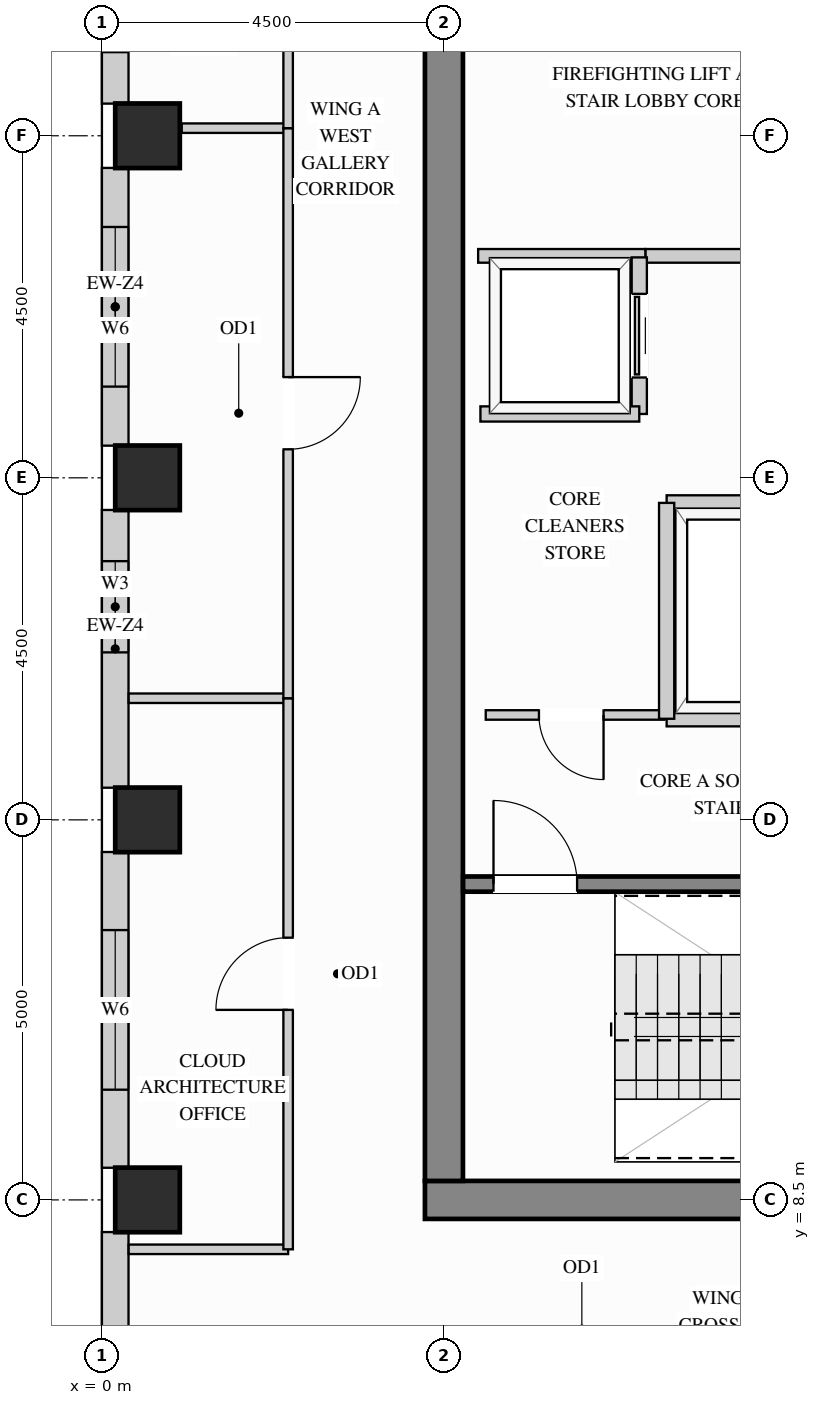
"""IFC4 building model, lengths in metres.
Left out: names, types, materials, properties, quantities, classifications, styles, units other than length and angle.
Written with IfcOpenShell. Run it as: python <this file> out.ifc"""

import sys

from ifc_helpers import new_model, si_unit, direction, frame, frame_2d, origin, origin_2d, place, context, subcontext, project, spatial, rectangle, extrude, source, transform, mapped, element, fill, save


model = new_model("IFC4")
c1 = context("Model", 3, precision=1e-05, world=origin(), true_north=direction((0.0, 1.0)))
c2 = subcontext(c1, "Body", "Model", "MODEL_VIEW")
j1 = project(units=[si_unit("LENGTHUNIT", "METRE"), si_unit("PLANEANGLEUNIT", "RADIAN")], contexts=[c1])
p1 = place(None, origin())
s1 = spatial("IfcSite", under=j1, at=p1, CompositionType="ELEMENT")
p2 = place(p1, origin())
s2 = spatial("IfcBuilding", under=s1, at=p2, CompositionType="ELEMENT")
p3 = place(p2, frame((0.0, 0.0, 266.4)))
s3 = spatial("IfcBuildingStorey", under=s2, at=p3, CompositionType="ELEMENT", Elevation=266.4)
m1 = source(origin(), c2, "Body", "SweptSolid", [
    extrude(rectangle(XDim=0.85, YDim=0.85, at=origin_2d()), origin(), (0.0, 0.0, 1.0), 3.4),
])
for number, where, z_axis, x_axis in (
    (1, (0.6, 13.5, 0.0), (0.0, 0.0, 1.0), (1.0, 0.0, 0.0)),
    (2, (0.6, 18.0, 0.0), (0.0, 0.0, 1.0), (1.0, 0.0, 0.0)),
    (3, (0.6, 22.5, 0.0), (0.0, 0.0, 1.0), (1.0, 0.0, 0.0)),
    (4, (0.6, 8.5, 0.0), (0.0, 0.0, 1.0), (1.0, 0.0, 0.0)),
):
    element("IfcColumn", number, at=place(p3, frame(where, z_axis=z_axis, x_axis=x_axis)), inside=s3, PredefinedType="COLUMN", context=c2, shape_type="MappedRepresentation", body=[
        mapped(m1, transform((0.0, 0.0, 0.0), x_axis=(1.0, 0.0, 0.0), y_axis=(0.0, 1.0, 0.0), z_axis=(0.0, 0.0, 1.0))),
    ])
m2 = source(origin(), c2, "Body", "SweptSolid", [
    extrude(rectangle(XDim=10.5, YDim=0.5, at=frame_2d((5.25, 0.0))), origin(), (0.0, 0.0, 1.0), 3.4),
])
p4 = place(p3, frame((4.25, 8.5, 0.0), z_axis=(0.0, 0.0, 1.0), x_axis=(1.0, 0.0, 0.0)))
e5 = element("IfcWall", 5, at=p4, inside=s3, PredefinedType="SHEAR", context=c2, shape_type="MappedRepresentation", body=[
    mapped(m2, transform((0.0, 0.0, 0.0), x_axis=(1.0, 0.0, 0.0), y_axis=(0.0, 1.0, 0.0), z_axis=(0.0, 0.0, 1.0))),
])
m3 = source(origin(), c2, "Body", "SweptSolid", [
    extrude(rectangle(XDim=20.5, YDim=0.5, at=frame_2d((10.25, 0.0))), origin(), (0.0, 0.0, 1.0), 3.4),
])
p5 = place(p3, frame((4.5, 8.75, 0.0), z_axis=(0.0, 0.0, 1.0), x_axis=(0.0, 1.0, 0.0)))
e6 = element("IfcWall", 6, at=p5, inside=s3, PredefinedType="SHEAR", context=c2, shape_type="MappedRepresentation", body=[
    mapped(m3, transform((0.0, 0.0, 0.0), x_axis=(1.0, 0.0, 0.0), y_axis=(0.0, 1.0, 0.0), z_axis=(0.0, 0.0, 1.0))),
])
p6 = place(p3, frame((0.175, 26.377, 0.0), z_axis=(0.0, 0.0, 1.0), x_axis=(0.0, -1.0, 0.0)))
e7 = element("IfcWall", 7, at=p6, inside=s3, PredefinedType="SOLIDWALL", context=c2, shape_type="SweptSolid", body=[
    extrude(rectangle(XDim=3.454, YDim=0.35, at=frame_2d((1.727, 0.0))), origin(), (0.0, 0.0, 1.0), 3.385),
])
p7 = place(p6, frame((0.677, 0.0, 0.78)))
e8 = element("IfcOpeningElement", 8, at=p7, cuts=e7, PredefinedType="OPENING", context=c2, shape_type="SweptSolid", body=[
    extrude(rectangle(XDim=2.1, YDim=2.25, at=frame_2d((1.05, 1.125))), frame((0.0, 0.185, 0.0), z_axis=(0.0, -1.0, 0.0), x_axis=(1.0, 0.0, 0.0)), (0.0, 0.0, 1.0), 0.37),
])
p8 = place(p3, frame((0.175, 22.077, 0.0), z_axis=(0.0, 0.0, 1.0), x_axis=(0.0, -1.0, 0.0)))
e9 = element("IfcWall", 9, at=p8, inside=s3, PredefinedType="SOLIDWALL", context=c2, shape_type="SweptSolid", body=[
    extrude(rectangle(XDim=3.654, YDim=0.35, at=frame_2d((1.827, 0.0))), origin(), (0.0, 0.0, 1.0), 3.385),
])
p9 = place(p8, frame((0.777, 0.0, 0.78)))
e10 = element("IfcOpeningElement", 10, at=p9, cuts=e9, PredefinedType="OPENING", context=c2, shape_type="SweptSolid", body=[
    extrude(rectangle(XDim=2.1, YDim=2.25, at=frame_2d((1.05, 1.125))), frame((0.0, 0.185, 0.0), z_axis=(0.0, -1.0, 0.0), x_axis=(1.0, 0.0, 0.0)), (0.0, 0.0, 1.0), 0.37),
])
p10 = place(p3, frame((0.175, 17.577, 0.0), z_axis=(0.0, 0.0, 1.0), x_axis=(0.0, -1.0, 0.0)))
e11 = element("IfcWall", 11, at=p10, inside=s3, PredefinedType="SOLIDWALL", context=c2, shape_type="SweptSolid", body=[
    extrude(rectangle(XDim=3.654, YDim=0.35, at=frame_2d((1.827, 0.0))), origin(), (0.0, 0.0, 1.0), 3.385),
])
p11 = place(p10, frame((0.674, 0.0, 0.78)))
e12 = element("IfcOpeningElement", 12, at=p11, cuts=e11, PredefinedType="OPENING", context=c2, shape_type="SweptSolid", body=[
    extrude(rectangle(XDim=1.2, YDim=2.25, at=frame_2d((0.6, 1.125))), frame((0.0, 0.185, 0.0), z_axis=(0.0, -1.0, 0.0), x_axis=(1.0, 0.0, 0.0)), (0.0, 0.0, 1.0), 0.37),
])
p12 = place(p3, frame((0.175, 13.077, 0.0), z_axis=(0.0, 0.0, 1.0), x_axis=(0.0, -1.0, 0.0)))
e13 = element("IfcWall", 13, at=p12, inside=s3, PredefinedType="SOLIDWALL", context=c2, shape_type="SweptSolid", body=[
    extrude(rectangle(XDim=4.154, YDim=0.35, at=frame_2d((2.077, 0.0))), origin(), (0.0, 0.0, 1.0), 3.385),
])
p13 = place(p12, frame((1.027, 0.0, 0.78)))
e14 = element("IfcOpeningElement", 14, at=p13, cuts=e13, PredefinedType="OPENING", context=c2, shape_type="SweptSolid", body=[
    extrude(rectangle(XDim=2.1, YDim=2.25, at=frame_2d((1.05, 1.125))), frame((0.0, 0.185, 0.0), z_axis=(0.0, -1.0, 0.0), x_axis=(1.0, 0.0, 0.0)), (0.0, 0.0, 1.0), 0.37),
])
p14 = place(p3, frame((0.175, 8.077, 0.0), z_axis=(0.0, 0.0, 1.0), x_axis=(0.0, -1.0, 0.0)))
e15 = element("IfcWall", 15, at=p14, inside=s3, PredefinedType="SOLIDWALL", context=c2, shape_type="SweptSolid", body=[
    extrude(rectangle(XDim=4.154, YDim=0.35, at=frame_2d((2.077, 0.0))), origin(), (0.0, 0.0, 1.0), 3.385),
])
p15 = place(p14, frame((2.406, 0.0, 0.78)))
e16 = element("IfcOpeningElement", 16, at=p15, cuts=e15, PredefinedType="OPENING", context=c2, shape_type="SweptSolid", body=[
    extrude(rectangle(XDim=1.2, YDim=2.25, at=frame_2d((0.6, 1.125))), frame((0.0, 0.185, 0.0), z_axis=(0.0, -1.0, 0.0), x_axis=(1.0, 0.0, 0.0)), (0.0, 0.0, 1.0), 0.37),
])
p16 = place(p3, frame((7.15, 20.92, 0.0), z_axis=(0.0, 0.0, 1.0), x_axis=(1.0, 0.0, 0.0)))
e17 = element("IfcWall", 17, at=p16, inside=s3, PredefinedType="PARTITIONING", context=c2, shape_type="SweptSolid", body=[
    extrude(rectangle(XDim=4.68, YDim=0.18, at=frame_2d((2.34, 0.0))), origin(), (0.0, 0.0, 1.0), 3.385),
])
p17 = place(p16, frame((2.2, 0.0, 0.0)))
e18 = element("IfcOpeningElement", 18, at=p17, cuts=e17, PredefinedType="OPENING", context=c2, shape_type="SweptSolid", body=[
    extrude(rectangle(XDim=1.1, YDim=2.15, at=frame_2d((0.55, 1.075))), frame((0.0, 0.1, 0.0), z_axis=(0.0, -1.0, 0.0), x_axis=(1.0, 0.0, 0.0)), (0.0, 0.0, 1.0), 0.2),
])
m4 = source(origin(), c2, "Body", "SweptSolid", [
    extrude(rectangle(XDim=2.2, YDim=0.18, at=frame_2d((1.1, 0.0))), origin(), (0.0, 0.0, 1.0), 3.385),
])
p18 = place(p3, frame((4.95, 20.92, 0.0), z_axis=(0.0, 0.0, 1.0), x_axis=(1.0, 0.0, 0.0)))
e19 = element("IfcWall", 19, at=p18, inside=s3, PredefinedType="PARTITIONING", context=c2, shape_type="MappedRepresentation", body=[
    mapped(m4, transform((0.0, 0.0, 0.0), x_axis=(1.0, 0.0, 0.0), y_axis=(0.0, 1.0, 0.0), z_axis=(0.0, 0.0, 1.0))),
])
p19 = place(p3, frame((5.05, 14.88, 0.0), z_axis=(0.0, 0.0, 1.0), x_axis=(1.0, 0.0, 0.0)))
e20 = element("IfcWall", 20, at=p19, inside=s3, PredefinedType="PARTITIONING", context=c2, shape_type="SweptSolid", body=[
    extrude(rectangle(XDim=2.35, YDim=0.125, at=frame_2d((1.175, 0.0))), origin(), (0.0, 0.0, 1.0), 3.385),
])
p20 = place(p19, frame((0.7, 0.0, 0.0)))
e21 = element("IfcOpeningElement", 21, at=p20, cuts=e20, PredefinedType="OPENING", context=c2, shape_type="SweptSolid", body=[
    extrude(rectangle(XDim=0.85, YDim=2.1, at=frame_2d((0.425, 1.05))), frame((0.0, 0.073, 0.0), z_axis=(0.0, -1.0, 0.0), x_axis=(1.0, 0.0, 0.0)), (0.0, 0.0, 1.0), 0.145),
])
m5 = source(origin(), c2, "Body", "SweptSolid", [
    extrude(rectangle(XDim=2.098, YDim=0.125, at=frame_2d((1.049, 0.0))), origin(), (0.0, 0.0, 1.0), 3.385),
])
for number, where, z_axis, x_axis in (
    (22, (0.352, 7.85, 0.0), (0.0, 0.0, 1.0), (1.0, 0.0, 0.0)),
    (23, (0.352, 15.1, 0.0), (0.0, 0.0, 1.0), (1.0, 0.0, 0.0)),
):
    element("IfcWall", number, at=place(p3, frame(where, z_axis=z_axis, x_axis=x_axis)), inside=s3, PredefinedType="PARTITIONING", context=c2, shape_type="MappedRepresentation", body=[
        mapped(m5, transform((0.0, 0.0, 0.0), x_axis=(1.0, 0.0, 0.0), y_axis=(0.0, 1.0, 0.0), z_axis=(0.0, 0.0, 1.0))),
    ])
m6 = source(origin(), c2, "Body", "SweptSolid", [
    extrude(rectangle(XDim=1.4, YDim=0.125, at=frame_2d((0.7, 0.0))), origin(), (0.0, 0.0, 1.0), 3.385),
])
p21 = place(p3, frame((1.05, 22.6, 0.0), z_axis=(0.0, 0.0, 1.0), x_axis=(1.0, 0.0, 0.0)))
e24 = element("IfcWall", 24, at=p21, inside=s3, PredefinedType="PARTITIONING", context=c2, shape_type="MappedRepresentation", body=[
    mapped(m6, transform((0.0, 0.0, 0.0), x_axis=(1.0, 0.0, 0.0), y_axis=(0.0, 1.0, 0.0), z_axis=(0.0, 0.0, 1.0))),
])
p22 = place(p3, frame((2.45, 7.85, 0.0), z_axis=(0.0, 0.0, 1.0), x_axis=(0.0, 1.0, 0.0)))
e25 = element("IfcWall", 25, at=p22, inside=s3, PredefinedType="PARTITIONING", context=c2, shape_type="SweptSolid", body=[
    extrude(rectangle(XDim=7.25, YDim=0.125, at=frame_2d((3.625, 0.0))), origin(), (0.0, 0.0, 1.0), 3.385),
])
p23 = place(p22, frame((3.15, 0.0, 0.0)))
e26 = element("IfcOpeningElement", 26, at=p23, cuts=e25, PredefinedType="OPENING", context=c2, shape_type="SweptSolid", body=[
    extrude(rectangle(XDim=0.95, YDim=2.15, at=frame_2d((0.475, 1.075))), frame((0.0, 0.073, 0.0), z_axis=(0.0, -1.0, 0.0), x_axis=(1.0, 0.0, 0.0)), (0.0, 0.0, 1.0), 0.145),
])
p24 = place(p3, frame((2.45, 15.1, 0.0), z_axis=(0.0, 0.0, 1.0), x_axis=(0.0, 1.0, 0.0)))
e27 = element("IfcWall", 27, at=p24, inside=s3, PredefinedType="PARTITIONING", context=c2, shape_type="SweptSolid", body=[
    extrude(rectangle(XDim=7.5, YDim=0.125, at=frame_2d((3.75, 0.0))), origin(), (0.0, 0.0, 1.0), 3.385),
])
p25 = place(p24, frame((3.275, 0.0, 0.0)))
e28 = element("IfcOpeningElement", 28, at=p25, cuts=e27, PredefinedType="OPENING", context=c2, shape_type="SweptSolid", body=[
    extrude(rectangle(XDim=0.95, YDim=2.15, at=frame_2d((0.475, 1.075))), frame((0.0, 0.073, 0.0), z_axis=(0.0, -1.0, 0.0), x_axis=(1.0, 0.0, 0.0)), (0.0, 0.0, 1.0), 0.145),
])
p26 = place(p3, frame((2.45, 22.6, 0.0), z_axis=(0.0, 0.0, 1.0), x_axis=(0.0, 1.0, 0.0)))
e29 = element("IfcWall", 29, at=p26, inside=s3, PredefinedType="PARTITIONING", context=c2, shape_type="SweptSolid", body=[
    extrude(rectangle(XDim=7.45, YDim=0.125, at=frame_2d((3.725, 0.0))), origin(), (0.0, 0.0, 1.0), 3.385),
])
p27 = place(p26, frame((3.25, 0.0, 0.0)))
e30 = element("IfcOpeningElement", 30, at=p27, cuts=e29, PredefinedType="OPENING", context=c2, shape_type="SweptSolid", body=[
    extrude(rectangle(XDim=0.95, YDim=2.15, at=frame_2d((0.475, 1.075))), frame((0.0, 0.073, 0.0), z_axis=(0.0, -1.0, 0.0), x_axis=(1.0, 0.0, 0.0)), (0.0, 0.0, 1.0), 0.145),
])
p28 = place(p3, frame((7.07, 18.84, 0.0), z_axis=(0.0, 0.0, 1.0), x_axis=(0.0, 1.0, 0.0)))
e31 = element("IfcWall", 31, at=p28, inside=s3, PredefinedType="PARTITIONING", context=c2, shape_type="SweptSolid", body=[
    extrude(rectangle(XDim=2.06, YDim=0.2, at=frame_2d((1.03, 0.0))), origin(), (0.0, 0.0, 1.0), 3.385),
])
p29 = place(p28, frame((0.48, 0.0, 0.0)))
e32 = element("IfcOpeningElement", 32, at=p29, cuts=e31, PredefinedType="OPENING", context=c2, shape_type="SweptSolid", body=[
    extrude(rectangle(XDim=1.1, YDim=2.2, at=frame_2d((0.55, 1.1))), frame((0.0, 0.11, 0.0), z_axis=(0.0, -1.0, 0.0), x_axis=(1.0, 0.0, 0.0)), (0.0, 0.0, 1.0), 0.22),
])
m7 = source(origin(), c2, "Body", "SweptSolid", [
    extrude(rectangle(XDim=2.09, YDim=0.2, at=frame_2d((1.045, 0.0))), origin(), (0.0, 0.0, 1.0), 3.385),
])
p30 = place(p3, frame((4.98, 18.84, 0.0), z_axis=(0.0, 0.0, 1.0), x_axis=(1.0, 0.0, 0.0)))
e33 = element("IfcWall", 33, at=p30, inside=s3, PredefinedType="PARTITIONING", context=c2, shape_type="MappedRepresentation", body=[
    mapped(m7, transform((0.0, 0.0, 0.0), x_axis=(1.0, 0.0, 0.0), y_axis=(0.0, 1.0, 0.0), z_axis=(0.0, 0.0, 1.0))),
])
m8 = source(origin(), c2, "Body", "SweptSolid", [
    extrude(rectangle(XDim=2.04, YDim=0.2, at=frame_2d((1.02, 0.0))), origin(), (0.0, 0.0, 1.0), 3.385),
])
for number, where, z_axis, x_axis in (
    (34, (7.43, 17.67, 0.0), (0.0, 0.0, 1.0), (1.0, 0.0, 0.0)),
    (35, (7.43, 14.83, 0.0), (0.0, 0.0, 1.0), (1.0, 0.0, 0.0)),
):
    element("IfcWall", number, at=place(p3, frame(where, z_axis=z_axis, x_axis=x_axis)), inside=s3, PredefinedType="PARTITIONING", context=c2, shape_type="MappedRepresentation", body=[
        mapped(m8, transform((0.0, 0.0, 0.0), x_axis=(1.0, 0.0, 0.0), y_axis=(0.0, 1.0, 0.0), z_axis=(0.0, 0.0, 1.0))),
    ])
m9 = source(origin(), c2, "Body", "SweptSolid", [
    extrude(rectangle(XDim=2.84, YDim=0.2, at=frame_2d((1.42, 0.0))), origin(), (0.0, 0.0, 1.0), 3.385),
])
p31 = place(p3, frame((7.43, 14.83, 0.0), z_axis=(0.0, 0.0, 1.0), x_axis=(0.0, 1.0, 0.0)))
e36 = element("IfcWall", 36, at=p31, inside=s3, PredefinedType="PARTITIONING", context=c2, shape_type="MappedRepresentation", body=[
    mapped(m9, transform((0.0, 0.0, 0.0), x_axis=(1.0, 0.0, 0.0), y_axis=(0.0, 1.0, 0.0), z_axis=(0.0, 0.0, 1.0))),
])
p32 = place(p3, frame((4.752, 12.655, 0.0), z_axis=(0.0, 0.0, 1.0), x_axis=(1.0, 0.0, 0.0)))
e37 = element("IfcWall", 37, at=p32, inside=s3, PredefinedType="SHEAR", context=c2, shape_type="SweptSolid", body=[
    extrude(rectangle(XDim=7.653, YDim=0.2, at=frame_2d((3.827, 0.0))), origin(), (0.0, 0.0, 1.0), 3.4),
])
p33 = place(p32, frame((0.4, 0.0, 0.0)))
e38 = element("IfcOpeningElement", 38, at=p33, cuts=e37, PredefinedType="OPENING", context=c2, shape_type="SweptSolid", body=[
    extrude(rectangle(XDim=1.1, YDim=2.15, at=frame_2d((0.55, 1.075))), frame((0.0, 0.11, 0.0), z_axis=(0.0, -1.0, 0.0), x_axis=(1.0, 0.0, 0.0)), (0.0, 0.0, 1.0), 0.22),
])
m10 = source(origin(), c2, "Body", "SweptSolid", [
    extrude(rectangle(XDim=1.1, YDim=2.2, at=frame_2d((0.55, 1.1))), frame((0.0, 0.025, 0.0), z_axis=(0.0, -1.0, 0.0), x_axis=(1.0, 0.0, 0.0)), (0.0, 0.0, 1.0), 0.05),
])
p34 = place(p29, origin())
e39 = element("IfcDoor", 39, at=p34, inside=s3, OperationType="SLIDING_TO_LEFT", PredefinedType="DOOR", context=c2, shape_type="MappedRepresentation", body=[
    mapped(m10, transform((0.0, 0.0, 0.0), x_axis=(1.0, 0.0, 0.0), y_axis=(0.0, 1.0, 0.0), z_axis=(0.0, 0.0, 1.0))),
])
fill(e32, e39)
m11 = source(origin(), c2, "Body", "SweptSolid", [
    extrude(rectangle(XDim=0.95, YDim=2.15, at=frame_2d((0.475, 1.075))), frame((0.0, 0.025, 0.0), z_axis=(0.0, -1.0, 0.0), x_axis=(1.0, 0.0, 0.0)), (0.0, 0.0, 1.0), 0.05),
])
p35 = place(p23, origin())
e40 = element("IfcDoor", 40, at=p35, inside=s3, OperationType="SINGLE_SWING_LEFT", PredefinedType="DOOR", context=c2, shape_type="MappedRepresentation", body=[
    mapped(m11, transform((0.0, 0.0, 0.0), x_axis=(1.0, 0.0, 0.0), y_axis=(0.0, 1.0, 0.0), z_axis=(0.0, 0.0, 1.0))),
])
fill(e26, e40)
p36 = place(p25, origin())
e41 = element("IfcDoor", 41, at=p36, inside=s3, OperationType="SINGLE_SWING_RIGHT", PredefinedType="DOOR", context=c2, shape_type="MappedRepresentation", body=[
    mapped(m11, transform((0.0, 0.0, 0.0), x_axis=(1.0, 0.0, 0.0), y_axis=(0.0, 1.0, 0.0), z_axis=(0.0, 0.0, 1.0))),
])
fill(e28, e41)
m12 = source(origin(), c2, "Body", "SweptSolid", [
    extrude(rectangle(XDim=0.85, YDim=2.1, at=frame_2d((0.425, 1.05))), frame((0.0, 0.025, 0.0), z_axis=(0.0, -1.0, 0.0), x_axis=(1.0, 0.0, 0.0)), (0.0, 0.0, 1.0), 0.05),
])
p37 = place(p20, origin())
e42 = element("IfcDoor", 42, at=p37, inside=s3, OperationType="SINGLE_SWING_RIGHT", PredefinedType="DOOR", context=c2, shape_type="MappedRepresentation", body=[
    mapped(m12, transform((0.0, 0.0, 0.0), x_axis=(1.0, 0.0, 0.0), y_axis=(0.0, 1.0, 0.0), z_axis=(0.0, 0.0, 1.0))),
])
fill(e21, e42)
m13 = source(origin(), c2, "Body", "SweptSolid", [
    extrude(rectangle(XDim=1.1, YDim=2.15, at=frame_2d((0.55, 1.075))), frame((0.0, 0.025, 0.0), z_axis=(0.0, -1.0, 0.0), x_axis=(1.0, 0.0, 0.0)), (0.0, 0.0, 1.0), 0.05),
])
p38 = place(p33, origin())
e43 = element("IfcDoor", 43, at=p38, inside=s3, OperationType="SINGLE_SWING_LEFT", PredefinedType="DOOR", context=c2, shape_type="MappedRepresentation", body=[
    mapped(m13, transform((0.0, 0.0, 0.0), x_axis=(1.0, 0.0, 0.0), y_axis=(0.0, 1.0, 0.0), z_axis=(0.0, 0.0, 1.0))),
])
fill(e38, e43)
m14 = source(origin(), c2, "Body", "SweptSolid", [
    extrude(rectangle(XDim=1.2, YDim=2.25, at=frame_2d((0.6, 1.125))), frame((0.0, 0.03, 0.0), z_axis=(0.0, -1.0, 0.0), x_axis=(1.0, 0.0, 0.0)), (0.0, 0.0, 1.0), 0.06),
])
p39 = place(p11, origin())
e44 = element("IfcWindow", 44, at=p39, inside=s3, PartitioningType="SINGLE_PANEL", PredefinedType="WINDOW", context=c2, shape_type="MappedRepresentation", body=[
    mapped(m14, transform((0.0, 0.0, 0.0), x_axis=(1.0, 0.0, 0.0), y_axis=(0.0, 1.0, 0.0), z_axis=(0.0, 0.0, 1.0))),
])
fill(e12, e44)
m15 = source(origin(), c2, "Body", "SweptSolid", [
    extrude(rectangle(XDim=2.1, YDim=2.25, at=frame_2d((1.05, 1.125))), frame((0.0, 0.03, 0.0), z_axis=(0.0, -1.0, 0.0), x_axis=(1.0, 0.0, 0.0)), (0.0, 0.0, 1.0), 0.06),
])
p40 = place(p7, origin())
e45 = element("IfcWindow", 45, at=p40, inside=s3, PartitioningType="SINGLE_PANEL", PredefinedType="WINDOW", context=c2, shape_type="MappedRepresentation", body=[
    mapped(m15, transform((0.0, 0.0, 0.0), x_axis=(1.0, 0.0, 0.0), y_axis=(0.0, 1.0, 0.0), z_axis=(0.0, 0.0, 1.0))),
])
fill(e8, e45)
p41 = place(p9, origin())
e46 = element("IfcWindow", 46, at=p41, inside=s3, PartitioningType="SINGLE_PANEL", PredefinedType="WINDOW", context=c2, shape_type="MappedRepresentation", body=[
    mapped(m15, transform((0.0, 0.0, 0.0), x_axis=(1.0, 0.0, 0.0), y_axis=(0.0, 1.0, 0.0), z_axis=(0.0, 0.0, 1.0))),
])
fill(e10, e46)
p42 = place(p13, origin())
e47 = element("IfcWindow", 47, at=p42, inside=s3, PartitioningType="SINGLE_PANEL", PredefinedType="WINDOW", context=c2, shape_type="MappedRepresentation", body=[
    mapped(m15, transform((0.0, 0.0, 0.0), x_axis=(1.0, 0.0, 0.0), y_axis=(0.0, 1.0, 0.0), z_axis=(0.0, 0.0, 1.0))),
])
fill(e14, e47)
save(model, sys.argv[1])
